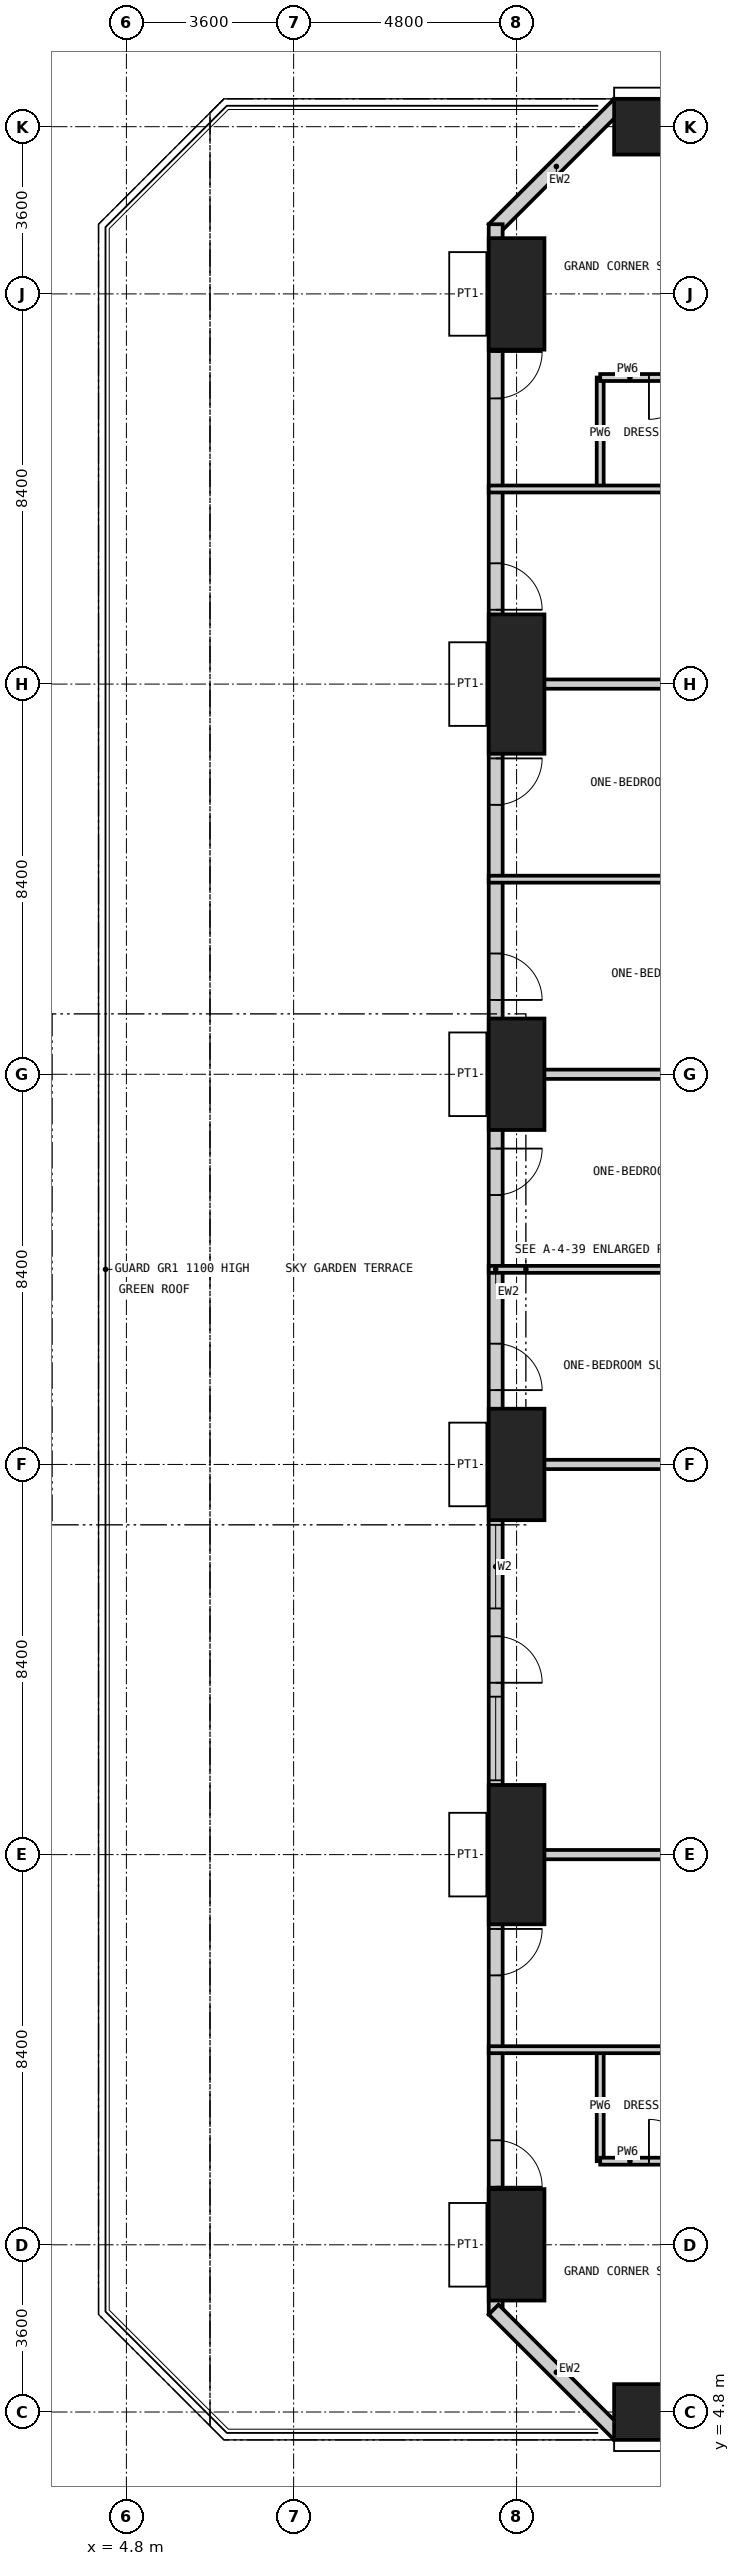
"""IFC4 building model, lengths in metres.
Left out: names, types, materials, properties, quantities, classifications, styles, units other than length and angle.
Written with IfcOpenShell. Run it as: python <this file> out.ifc"""

import sys

from ifc_helpers import new_model, si_unit, direction, frame, frame_2d, origin, origin_2d, place, context, subcontext, project, spatial, rectangle, extrude, element, fill, save


model = new_model("IFC4")
c1 = context("Model", 3, precision=1e-05, world=origin(), true_north=direction((0.0, 1.0)))
c2 = subcontext(c1, "Body", "Model", "MODEL_VIEW")
j1 = project(units=[si_unit("LENGTHUNIT", "METRE"), si_unit("PLANEANGLEUNIT", "RADIAN")], contexts=[c1])
p1 = place(None, origin())
s1 = spatial("IfcSite", under=j1, at=p1, CompositionType="ELEMENT")
p2 = place(p1, origin())
s2 = spatial("IfcBuilding", under=s1, at=p2, CompositionType="ELEMENT")
p3 = place(p2, frame((0.0, 0.0, 225.6)))
s3 = spatial("IfcBuildingStorey", under=s2, at=p3, CompositionType="ELEMENT", Elevation=225.6)
p4 = place(p3, frame((13.2, 8.4, -0.35), z_axis=(0.0, 0.0, 1.0), x_axis=(1.0, 0.0, 0.0)))
e1 = element("IfcColumn", 1, at=p4, inside=s3, PredefinedType="COLUMN", context=c2, shape_type="SweptSolid", body=[
    extrude(rectangle(XDim=1.2, YDim=2.4, at=origin_2d()), origin(), (0.0, 0.0, 1.0), 3.9),
])
p5 = place(p3, frame((13.2, 16.8, -0.35), z_axis=(0.0, 0.0, 1.0), x_axis=(1.0, 0.0, 0.0)))
e2 = element("IfcColumn", 2, at=p5, inside=s3, PredefinedType="COLUMN", context=c2, shape_type="SweptSolid", body=[
    extrude(rectangle(XDim=1.2, YDim=3.0, at=origin_2d()), origin(), (0.0, 0.0, 1.0), 3.9),
])
for number, where, z_axis, x_axis in (
    (3, (13.2, 25.2, -0.35), (0.0, 0.0, 1.0), (1.0, 0.0, 0.0)),
    (4, (13.2, 33.6, -0.35), (0.0, 0.0, 1.0), (1.0, 0.0, 0.0)),
):
    element("IfcColumn", number, at=place(p3, frame(where, z_axis=z_axis, x_axis=x_axis)), inside=s3, PredefinedType="COLUMN", context=c2, shape_type="SweptSolid", body=[
        extrude(rectangle(XDim=1.2, YDim=2.4, at=origin_2d()), origin(), (0.0, 0.0, 1.0), 3.9),
    ])
p6 = place(p3, frame((13.2, 42.0, -0.35), z_axis=(0.0, 0.0, 1.0), x_axis=(1.0, 0.0, 0.0)))
e5 = element("IfcColumn", 5, at=p6, inside=s3, PredefinedType="COLUMN", context=c2, shape_type="SweptSolid", body=[
    extrude(rectangle(XDim=1.2, YDim=3.0, at=origin_2d()), origin(), (0.0, 0.0, 1.0), 3.9),
])
p7 = place(p3, frame((13.2, 50.4, -0.35), z_axis=(0.0, 0.0, 1.0), x_axis=(1.0, 0.0, 0.0)))
e6 = element("IfcColumn", 6, at=p7, inside=s3, PredefinedType="COLUMN", context=c2, shape_type="SweptSolid", body=[
    extrude(rectangle(XDim=1.2, YDim=2.4, at=origin_2d()), origin(), (0.0, 0.0, 1.0), 3.9),
])
for number, where, z_axis, x_axis in (
    (7, (16.8, 4.8, -0.35), (0.0, 0.0, 1.0), (1.0, 0.0, 0.0)),
    (8, (16.8, 54.0, -0.35), (0.0, 0.0, 1.0), (1.0, 0.0, 0.0)),
):
    element("IfcColumn", number, at=place(p3, frame(where, z_axis=z_axis, x_axis=x_axis)), inside=s3, PredefinedType="COLUMN", context=c2, shape_type="SweptSolid", body=[
        extrude(rectangle(XDim=3.0, YDim=1.2, at=origin_2d()), origin(), (0.0, 0.0, 1.0), 3.9),
    ])
p8 = place(p3, frame((15.406, 54.494, 0.0), z_axis=(0.0, 0.0, 1.0), x_axis=(-0.707106781187, -0.707106781187, 0.0)))
e9 = element("IfcWall", 9, at=p8, inside=s3, PredefinedType="SOLIDWALL", context=c2, shape_type="SweptSolid", body=[
    extrude(rectangle(XDim=3.818, YDim=0.3, at=frame_2d((1.909, 0.0))), origin(), (0.0, 0.0, 1.0), 3.55),
])
p9 = place(p3, frame((12.75, 51.9, 0.0), z_axis=(0.0, 0.0, 1.0), x_axis=(0.0, -1.0, 0.0)))
e10 = element("IfcWall", 10, at=p9, inside=s3, PredefinedType="SOLIDWALL", context=c2, shape_type="SweptSolid", body=[
    extrude(rectangle(XDim=45.0, YDim=0.3, at=frame_2d((22.5, 0.0))), origin(), (0.0, 0.0, 1.0), 3.1),
])
p10 = place(p9, frame((41.25, 0.0, 0.0)))
e11 = element("IfcOpeningElement", 11, at=p10, cuts=e10, PredefinedType="OPENING", context=c2, shape_type="SweptSolid", body=[
    extrude(rectangle(XDim=1.0, YDim=2.4, at=frame_2d((0.5, 1.2))), frame((0.0, 0.16, 0.0), z_axis=(0.0, -1.0, 0.0), x_axis=(1.0, 0.0, 0.0)), (0.0, 0.0, 1.0), 0.32),
])
p11 = place(p9, frame((36.7, 0.0, 0.0)))
e12 = element("IfcOpeningElement", 12, at=p11, cuts=e10, PredefinedType="OPENING", context=c2, shape_type="SweptSolid", body=[
    extrude(rectangle(XDim=1.0, YDim=2.4, at=frame_2d((0.5, 1.2))), frame((0.0, 0.16, 0.0), z_axis=(0.0, -1.0, 0.0), x_axis=(1.0, 0.0, 0.0)), (0.0, 0.0, 1.0), 0.32),
])
p12 = place(p9, frame((30.4, 0.0, 0.0)))
e13 = element("IfcOpeningElement", 13, at=p12, cuts=e10, PredefinedType="OPENING", context=c2, shape_type="SweptSolid", body=[
    extrude(rectangle(XDim=1.0, YDim=2.4, at=frame_2d((0.5, 1.2))), frame((0.0, 0.16, 0.0), z_axis=(0.0, -1.0, 0.0), x_axis=(1.0, 0.0, 0.0)), (0.0, 0.0, 1.0), 0.32),
])
p13 = place(p9, frame((31.7, 0.0, 0.6)))
e14 = element("IfcOpeningElement", 14, at=p13, cuts=e10, PredefinedType="OPENING", context=c2, shape_type="SweptSolid", body=[
    extrude(rectangle(XDim=1.8, YDim=2.1, at=frame_2d((0.9, 1.05))), frame((0.0, 0.16, 0.0), z_axis=(0.0, -1.0, 0.0), x_axis=(1.0, 0.0, 0.0)), (0.0, 0.0, 1.0), 0.32),
])
p14 = place(p9, frame((28.0, 0.0, 0.6)))
e15 = element("IfcOpeningElement", 15, at=p14, cuts=e10, PredefinedType="OPENING", context=c2, shape_type="SweptSolid", body=[
    extrude(rectangle(XDim=1.8, YDim=2.1, at=frame_2d((0.9, 1.05))), frame((0.0, 0.16, 0.0), z_axis=(0.0, -1.0, 0.0), x_axis=(1.0, 0.0, 0.0)), (0.0, 0.0, 1.0), 0.32),
])
p15 = place(p9, frame((24.1, 0.0, 0.0)))
e16 = element("IfcOpeningElement", 16, at=p15, cuts=e10, PredefinedType="OPENING", context=c2, shape_type="SweptSolid", body=[
    extrude(rectangle(XDim=1.0, YDim=2.4, at=frame_2d((0.5, 1.2))), frame((0.0, 0.16, 0.0), z_axis=(0.0, -1.0, 0.0), x_axis=(1.0, 0.0, 0.0)), (0.0, 0.0, 1.0), 0.32),
])
p16 = place(p9, frame((19.9, 0.0, 0.0)))
e17 = element("IfcOpeningElement", 17, at=p16, cuts=e10, PredefinedType="OPENING", context=c2, shape_type="SweptSolid", body=[
    extrude(rectangle(XDim=1.0, YDim=2.4, at=frame_2d((0.5, 1.2))), frame((0.0, 0.16, 0.0), z_axis=(0.0, -1.0, 0.0), x_axis=(1.0, 0.0, 0.0)), (0.0, 0.0, 1.0), 0.32),
])
p17 = place(p9, frame((15.7, 0.0, 0.0)))
e18 = element("IfcOpeningElement", 18, at=p17, cuts=e10, PredefinedType="OPENING", context=c2, shape_type="SweptSolid", body=[
    extrude(rectangle(XDim=1.0, YDim=2.4, at=frame_2d((0.5, 1.2))), frame((0.0, 0.16, 0.0), z_axis=(0.0, -1.0, 0.0), x_axis=(1.0, 0.0, 0.0)), (0.0, 0.0, 1.0), 0.32),
])
p18 = place(p9, frame((11.5, 0.0, 0.0)))
e19 = element("IfcOpeningElement", 19, at=p18, cuts=e10, PredefinedType="OPENING", context=c2, shape_type="SweptSolid", body=[
    extrude(rectangle(XDim=1.0, YDim=2.4, at=frame_2d((0.5, 1.2))), frame((0.0, 0.16, 0.0), z_axis=(0.0, -1.0, 0.0), x_axis=(1.0, 0.0, 0.0)), (0.0, 0.0, 1.0), 0.32),
])
p19 = place(p9, frame((7.3, 0.0, 0.0)))
e20 = element("IfcOpeningElement", 20, at=p19, cuts=e10, PredefinedType="OPENING", context=c2, shape_type="SweptSolid", body=[
    extrude(rectangle(XDim=1.0, YDim=2.4, at=frame_2d((0.5, 1.2))), frame((0.0, 0.16, 0.0), z_axis=(0.0, -1.0, 0.0), x_axis=(1.0, 0.0, 0.0)), (0.0, 0.0, 1.0), 0.32),
])
p20 = place(p9, frame((2.75, 0.0, 0.0)))
e21 = element("IfcOpeningElement", 21, at=p20, cuts=e10, PredefinedType="OPENING", context=c2, shape_type="SweptSolid", body=[
    extrude(rectangle(XDim=1.0, YDim=2.4, at=frame_2d((0.5, 1.2))), frame((0.0, 0.16, 0.0), z_axis=(0.0, -1.0, 0.0), x_axis=(1.0, 0.0, 0.0)), (0.0, 0.0, 1.0), 0.32),
])
p21 = place(p3, frame((12.706, 7.006, 0.0), z_axis=(0.0, 0.0, 1.0), x_axis=(0.707074812166, -0.707138748762, 0.0)))
e22 = element("IfcWall", 22, at=p21, inside=s3, PredefinedType="SOLIDWALL", context=c2, shape_type="SweptSolid", body=[
    extrude(rectangle(XDim=3.818, YDim=0.3, at=frame_2d((1.909, 0.0))), origin(), (0.0, 0.0, 1.0), 3.55),
])
for number, where, z_axis, x_axis in (
    (23, (12.6, 16.8, 0.0), (0.0, 0.0, 1.0), (1.0, 0.0, 0.0)),
    (24, (12.6, 25.2, 0.0), (0.0, 0.0, 1.0), (1.0, 0.0, 0.0)),
    (25, (12.6, 33.6, 0.0), (0.0, 0.0, 1.0), (1.0, 0.0, 0.0)),
    (26, (12.6, 42.0, 0.0), (0.0, 0.0, 1.0), (1.0, 0.0, 0.0)),
):
    element("IfcWall", number, at=place(p3, frame(where, z_axis=z_axis, x_axis=x_axis)), inside=s3, PredefinedType="PARTITIONING", context=c2, shape_type="SweptSolid", body=[
        extrude(rectangle(XDim=9.325, YDim=0.2, at=frame_2d((4.663, 0.0))), origin(), (0.0, 0.0, 1.0), 3.55),
    ])
for number, where, z_axis, x_axis in (
    (27, (15.0, 10.2, 0.0), (0.0, 0.0, 1.0), (0.0, 1.0, 0.0)),
    (28, (15.0, 46.2, 0.0), (0.0, 0.0, 1.0), (0.0, 1.0, 0.0)),
):
    element("IfcWall", number, at=place(p3, frame(where, z_axis=z_axis, x_axis=x_axis)), inside=s3, PredefinedType="PARTITIONING", context=c2, shape_type="SweptSolid", body=[
        extrude(rectangle(XDim=2.4, YDim=0.15, at=frame_2d((1.2, 0.0))), origin(), (0.0, 0.0, 1.0), 3.55),
    ])
p22 = place(p3, frame((15.0, 10.2, 0.0), z_axis=(0.0, 0.0, 1.0), x_axis=(1.0, 0.0, 0.0)))
e29 = element("IfcWall", 29, at=p22, inside=s3, PredefinedType="PARTITIONING", context=c2, shape_type="SweptSolid", body=[
    extrude(rectangle(XDim=3.0, YDim=0.15, at=frame_2d((1.5, 0.0))), origin(), (0.0, 0.0, 1.0), 3.55),
])
p23 = place(p22, frame((1.05, 0.0, 0.0)))
e30 = element("IfcOpeningElement", 30, at=p23, cuts=e29, PredefinedType="OPENING", context=c2, shape_type="SweptSolid", body=[
    extrude(rectangle(XDim=0.9, YDim=2.1, at=frame_2d((0.45, 1.05))), frame((0.0, 0.085, 0.0), z_axis=(0.0, -1.0, 0.0), x_axis=(1.0, 0.0, 0.0)), (0.0, 0.0, 1.0), 0.17),
])
p24 = place(p3, frame((12.6, 12.6, 0.0), z_axis=(0.0, 0.0, 1.0), x_axis=(1.0, 0.0, 0.0)))
e31 = element("IfcWall", 31, at=p24, inside=s3, PredefinedType="PARTITIONING", context=c2, shape_type="SweptSolid", body=[
    extrude(rectangle(XDim=8.4, YDim=0.15, at=frame_2d((4.2, 0.0))), origin(), (0.0, 0.0, 1.0), 3.55),
])
p25 = place(p3, frame((12.6, 29.4, 0.0), z_axis=(0.0, 0.0, 1.0), x_axis=(1.0, 0.0, 0.0)))
e32 = element("IfcWall", 32, at=p25, inside=s3, PredefinedType="PARTITIONING", context=c2, shape_type="SweptSolid", body=[
    extrude(rectangle(XDim=9.325, YDim=0.15, at=frame_2d((4.663, 0.0))), origin(), (0.0, 0.0, 1.0), 3.55),
])
p26 = place(p25, frame((4.212, 0.0, 0.0)))
e33 = element("IfcOpeningElement", 33, at=p26, cuts=e32, PredefinedType="OPENING", context=c2, shape_type="SweptSolid", body=[
    extrude(rectangle(XDim=0.9, YDim=2.1, at=frame_2d((0.45, 1.05))), frame((0.0, 0.085, 0.0), z_axis=(0.0, -1.0, 0.0), x_axis=(1.0, 0.0, 0.0)), (0.0, 0.0, 1.0), 0.17),
])
p27 = place(p3, frame((12.6, 37.8, 0.0), z_axis=(0.0, 0.0, 1.0), x_axis=(1.0, 0.0, 0.0)))
e34 = element("IfcWall", 34, at=p27, inside=s3, PredefinedType="PARTITIONING", context=c2, shape_type="SweptSolid", body=[
    extrude(rectangle(XDim=9.325, YDim=0.15, at=frame_2d((4.663, 0.0))), origin(), (0.0, 0.0, 1.0), 3.55),
])
p28 = place(p27, frame((4.212, 0.0, 0.0)))
e35 = element("IfcOpeningElement", 35, at=p28, cuts=e34, PredefinedType="OPENING", context=c2, shape_type="SweptSolid", body=[
    extrude(rectangle(XDim=0.9, YDim=2.1, at=frame_2d((0.45, 1.05))), frame((0.0, 0.085, 0.0), z_axis=(0.0, -1.0, 0.0), x_axis=(1.0, 0.0, 0.0)), (0.0, 0.0, 1.0), 0.17),
])
p29 = place(p3, frame((12.6, 46.2, 0.0), z_axis=(0.0, 0.0, 1.0), x_axis=(1.0, 0.0, 0.0)))
e36 = element("IfcWall", 36, at=p29, inside=s3, PredefinedType="PARTITIONING", context=c2, shape_type="SweptSolid", body=[
    extrude(rectangle(XDim=8.4, YDim=0.15, at=frame_2d((4.2, 0.0))), origin(), (0.0, 0.0, 1.0), 3.55),
])
p30 = place(p3, frame((15.0, 48.6, 0.0), z_axis=(0.0, 0.0, 1.0), x_axis=(1.0, 0.0, 0.0)))
e37 = element("IfcWall", 37, at=p30, inside=s3, PredefinedType="PARTITIONING", context=c2, shape_type="SweptSolid", body=[
    extrude(rectangle(XDim=3.0, YDim=0.15, at=frame_2d((1.5, 0.0))), origin(), (0.0, 0.0, 1.0), 3.55),
])
p31 = place(p30, frame((1.05, 0.0, 0.0)))
e38 = element("IfcOpeningElement", 38, at=p31, cuts=e37, PredefinedType="OPENING", context=c2, shape_type="SweptSolid", body=[
    extrude(rectangle(XDim=0.9, YDim=2.1, at=frame_2d((0.45, 1.05))), frame((0.0, 0.085, 0.0), z_axis=(0.0, -1.0, 0.0), x_axis=(1.0, 0.0, 0.0)), (0.0, 0.0, 1.0), 0.17),
])
p32 = place(p10, origin())
e39 = element("IfcDoor", 39, at=p32, inside=s3, OperationType="SINGLE_SWING_RIGHT", PredefinedType="DOOR", context=c2, shape_type="SweptSolid", body=[
    extrude(rectangle(XDim=1.0, YDim=2.4, at=frame_2d((0.5, 1.2))), frame((0.0, 0.025, 0.0), z_axis=(0.0, -1.0, 0.0), x_axis=(1.0, 0.0, 0.0)), (0.0, 0.0, 1.0), 0.05),
])
fill(e11, e39)
p33 = place(p11, origin())
e40 = element("IfcDoor", 40, at=p33, inside=s3, OperationType="SINGLE_SWING_LEFT", PredefinedType="DOOR", context=c2, shape_type="SweptSolid", body=[
    extrude(rectangle(XDim=1.0, YDim=2.4, at=frame_2d((0.5, 1.2))), frame((0.0, 0.025, 0.0), z_axis=(0.0, -1.0, 0.0), x_axis=(1.0, 0.0, 0.0)), (0.0, 0.0, 1.0), 0.05),
])
fill(e12, e40)
p34 = place(p12, origin())
e41 = element("IfcDoor", 41, at=p34, inside=s3, OperationType="SINGLE_SWING_RIGHT", PredefinedType="DOOR", context=c2, shape_type="SweptSolid", body=[
    extrude(rectangle(XDim=1.0, YDim=2.4, at=frame_2d((0.5, 1.2))), frame((0.0, 0.025, 0.0), z_axis=(0.0, -1.0, 0.0), x_axis=(1.0, 0.0, 0.0)), (0.0, 0.0, 1.0), 0.05),
])
fill(e13, e41)
p35 = place(p13, origin())
e42 = element("IfcWindow", 42, at=p35, inside=s3, PartitioningType="SINGLE_PANEL", PredefinedType="WINDOW", context=c2, shape_type="SweptSolid", body=[
    extrude(rectangle(XDim=1.8, YDim=2.1, at=frame_2d((0.9, 1.05))), frame((0.0, 0.03, 0.0), z_axis=(0.0, -1.0, 0.0), x_axis=(1.0, 0.0, 0.0)), (0.0, 0.0, 1.0), 0.06),
])
fill(e14, e42)
p36 = place(p14, origin())
e43 = element("IfcWindow", 43, at=p36, inside=s3, PartitioningType="SINGLE_PANEL", PredefinedType="WINDOW", context=c2, shape_type="SweptSolid", body=[
    extrude(rectangle(XDim=1.8, YDim=2.1, at=frame_2d((0.9, 1.05))), frame((0.0, 0.03, 0.0), z_axis=(0.0, -1.0, 0.0), x_axis=(1.0, 0.0, 0.0)), (0.0, 0.0, 1.0), 0.06),
])
fill(e15, e43)
p37 = place(p15, origin())
e44 = element("IfcDoor", 44, at=p37, inside=s3, OperationType="SINGLE_SWING_RIGHT", PredefinedType="DOOR", context=c2, shape_type="SweptSolid", body=[
    extrude(rectangle(XDim=1.0, YDim=2.4, at=frame_2d((0.5, 1.2))), frame((0.0, 0.025, 0.0), z_axis=(0.0, -1.0, 0.0), x_axis=(1.0, 0.0, 0.0)), (0.0, 0.0, 1.0), 0.05),
])
fill(e16, e44)
p38 = place(p16, origin())
e45 = element("IfcDoor", 45, at=p38, inside=s3, OperationType="SINGLE_SWING_LEFT", PredefinedType="DOOR", context=c2, shape_type="SweptSolid", body=[
    extrude(rectangle(XDim=1.0, YDim=2.4, at=frame_2d((0.5, 1.2))), frame((0.0, 0.025, 0.0), z_axis=(0.0, -1.0, 0.0), x_axis=(1.0, 0.0, 0.0)), (0.0, 0.0, 1.0), 0.05),
])
fill(e17, e45)
p39 = place(p17, origin())
e46 = element("IfcDoor", 46, at=p39, inside=s3, OperationType="SINGLE_SWING_RIGHT", PredefinedType="DOOR", context=c2, shape_type="SweptSolid", body=[
    extrude(rectangle(XDim=1.0, YDim=2.4, at=frame_2d((0.5, 1.2))), frame((0.0, 0.025, 0.0), z_axis=(0.0, -1.0, 0.0), x_axis=(1.0, 0.0, 0.0)), (0.0, 0.0, 1.0), 0.05),
])
fill(e18, e46)
p40 = place(p18, origin())
e47 = element("IfcDoor", 47, at=p40, inside=s3, OperationType="SINGLE_SWING_LEFT", PredefinedType="DOOR", context=c2, shape_type="SweptSolid", body=[
    extrude(rectangle(XDim=1.0, YDim=2.4, at=frame_2d((0.5, 1.2))), frame((0.0, 0.025, 0.0), z_axis=(0.0, -1.0, 0.0), x_axis=(1.0, 0.0, 0.0)), (0.0, 0.0, 1.0), 0.05),
])
fill(e19, e47)
p41 = place(p19, origin())
e48 = element("IfcDoor", 48, at=p41, inside=s3, OperationType="SINGLE_SWING_RIGHT", PredefinedType="DOOR", context=c2, shape_type="SweptSolid", body=[
    extrude(rectangle(XDim=1.0, YDim=2.4, at=frame_2d((0.5, 1.2))), frame((0.0, 0.025, 0.0), z_axis=(0.0, -1.0, 0.0), x_axis=(1.0, 0.0, 0.0)), (0.0, 0.0, 1.0), 0.05),
])
fill(e20, e48)
p42 = place(p20, origin())
e49 = element("IfcDoor", 49, at=p42, inside=s3, OperationType="SINGLE_SWING_LEFT", PredefinedType="DOOR", context=c2, shape_type="SweptSolid", body=[
    extrude(rectangle(XDim=1.0, YDim=2.4, at=frame_2d((0.5, 1.2))), frame((0.0, 0.025, 0.0), z_axis=(0.0, -1.0, 0.0), x_axis=(1.0, 0.0, 0.0)), (0.0, 0.0, 1.0), 0.05),
])
fill(e21, e49)
p43 = place(p23, origin())
e50 = element("IfcDoor", 50, at=p43, inside=s3, OperationType="SINGLE_SWING_LEFT", PredefinedType="DOOR", context=c2, shape_type="SweptSolid", body=[
    extrude(rectangle(XDim=0.9, YDim=2.1, at=frame_2d((0.45, 1.05))), frame((0.0, 0.025, 0.0), z_axis=(0.0, -1.0, 0.0), x_axis=(1.0, 0.0, 0.0)), (0.0, 0.0, 1.0), 0.05),
])
fill(e30, e50)
p44 = place(p31, frame((0.9, 0.0, 0.0), z_axis=(0.0, 0.0, 1.0), x_axis=(-1.0, 0.0, 0.0)))
e51 = element("IfcDoor", 51, at=p44, inside=s3, OperationType="SINGLE_SWING_RIGHT", PredefinedType="DOOR", context=c2, shape_type="SweptSolid", body=[
    extrude(rectangle(XDim=0.9, YDim=2.1, at=frame_2d((0.45, 1.05))), frame((0.0, 0.025, 0.0), z_axis=(0.0, -1.0, 0.0), x_axis=(1.0, 0.0, 0.0)), (0.0, 0.0, 1.0), 0.05),
])
fill(e38, e51)
save(model, sys.argv[1])
